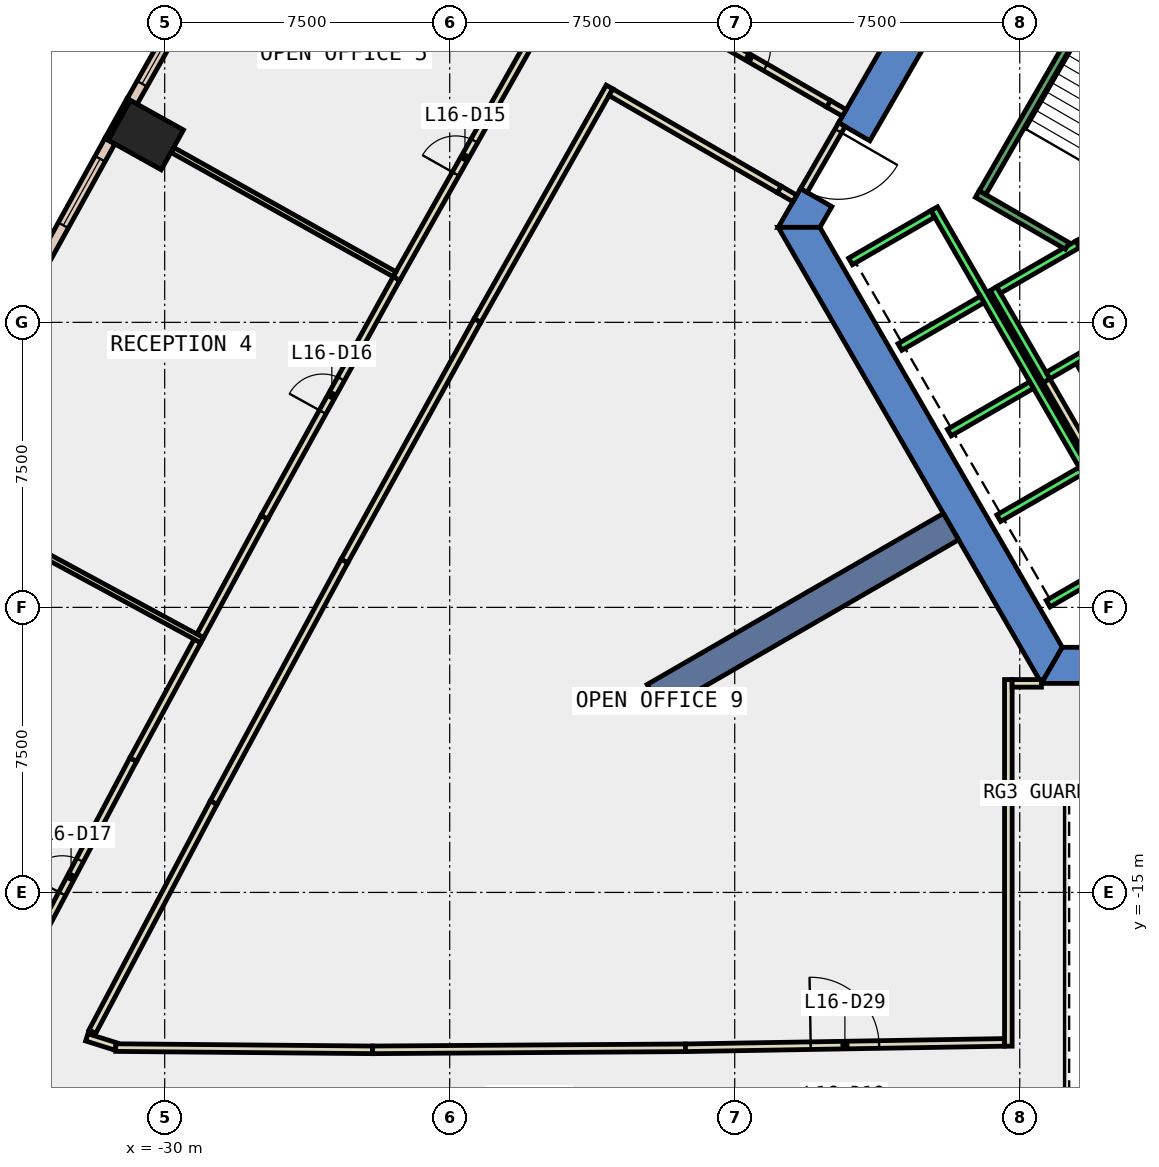
"""IFC4 building model, lengths in metres.
Left out: names, types, materials, properties, quantities, classifications, styles, units other than length and angle.
Written with IfcOpenShell. Run it as: python <this file> out.ifc"""

import sys

from ifc_helpers import new_model, si_unit, direction, frame, frame_2d, origin, origin_2d, place, context, subcontext, project, spatial, polyline, rectangle, outline, extrude, element, fill, save


model = new_model("IFC4")
c1 = context("Model", 3, precision=1e-05, world=origin(), true_north=direction((0.0, 1.0)))
c2 = subcontext(c1, "Body", "Model", "MODEL_VIEW")
j1 = project(units=[si_unit("LENGTHUNIT", "METRE"), si_unit("PLANEANGLEUNIT", "RADIAN")], contexts=[c1])
p1 = place(None, origin())
s1 = spatial("IfcSite", under=j1, at=p1, CompositionType="ELEMENT")
p2 = place(p1, origin())
s2 = spatial("IfcBuilding", under=s1, at=p2, CompositionType="ELEMENT")
p3 = place(p2, frame((0.0, 0.0, 77.0)))
s3 = spatial("IfcBuildingStorey", under=s2, at=p3, CompositionType="ELEMENT", Elevation=77.0)
p4 = place(p3, frame((-30.497, 4.928, -0.4), z_axis=(0.0, 0.0, 1.0), x_axis=(0.486914781103, 0.873449481048, 0.0)))
e1 = element("IfcColumn", 1, at=p4, inside=s3, PredefinedType="COLUMN", context=c2, shape_type="SweptSolid", body=[
    extrude(rectangle(XDim=1.2, YDim=1.6, at=origin_2d()), origin(), (0.0, 0.0, 1.0), 4.0),
])
p5 = place(p3, frame((0.0, 0.0, -0.4)))
e2 = element("IfcWall", 2, at=p5, inside=s3, PredefinedType="SHEAR", context=c2, shape_type="SweptSolid", body=[
    extrude(outline(polyline([(-12.267, 5.252), (-11.444, 4.777), (-6.38, 13.55), (-6.928, 14.5), (-12.267, 5.252)])), origin(), (0.0, 0.0, 1.0), 4.0),
])
p6 = place(p3, frame((0.0, 0.0, -0.4)))
e3 = element("IfcWall", 3, at=p6, inside=s3, PredefinedType="SHEAR", context=c2, shape_type="SweptSolid", body=[
    extrude(outline(polyline([(-12.444, 3.045), (-13.267, 3.52), (-13.856, 2.5), (-12.759, 2.5), (-12.444, 3.045)])), origin(), (0.0, 0.0, 1.0), 4.0),
])
p7 = place(p3, frame((0.0, 0.0, -0.4)))
e4 = element("IfcWall", 4, at=p7, inside=s3, PredefinedType="SHEAR", context=c2, shape_type="SweptSolid", body=[
    extrude(outline(polyline([(-13.856, 2.5), (-6.928, -9.5), (-6.38, -8.55), (-12.759, 2.5), (-13.856, 2.5)])), origin(), (0.0, 0.0, 1.0), 4.0),
])
p8 = place(p3, frame((0.0, 0.0, -0.4)))
e5 = element("IfcWall", 5, at=p8, inside=s3, PredefinedType="SHEAR", context=c2, shape_type="SweptSolid", body=[
    extrude(outline(polyline([(3.75, -9.5), (3.75, -8.55), (-6.38, -8.55), (-6.928, -9.5), (3.75, -9.5)])), origin(), (0.0, 0.0, 1.0), 4.0),
])
p9 = place(p3, frame((-9.31, -5.375, -0.4), z_axis=(0.0, 0.0, 1.0), x_axis=(-0.866017533419, -0.500013631625, 0.0)))
e6 = element("IfcWall", 6, at=p9, inside=s3, PredefinedType="SHEAR", context=c2, shape_type="SweptSolid", body=[
    extrude(rectangle(XDim=9.0, YDim=0.8, at=frame_2d((4.5, 0.0))), origin(), (0.0, 0.0, 1.0), 4.0),
])
p10 = place(p3, frame((-30.947, 5.866, 0.0), z_axis=(0.0, 0.0, 1.0), x_axis=(-0.486817526853, -0.873503689488, 0.0)))
e7 = element("IfcWall", 7, at=p10, inside=s3, PredefinedType="STANDARD", context=c2, shape_type="SweptSolid", body=[
    extrude(rectangle(XDim=1.2, YDim=0.1, at=frame_2d((0.6, 0.0))), origin(), (0.0, 0.0, 1.0), 3.6),
])
p11 = place(p3, frame((-27.84, 11.151, 0.0), z_axis=(0.0, 0.0, 1.0), x_axis=(-0.492097935349, -0.870539845168, 0.0)))
e8 = element("IfcWall", 8, at=p11, inside=s3, PredefinedType="STANDARD", context=c2, shape_type="SweptSolid", body=[
    extrude(rectangle(XDim=6.131, YDim=0.3, at=frame_2d((3.065, 0.0))), origin(), (0.0, 0.0, 1.0), 3.6),
])
p12 = place(p11, frame((0.533, 0.0, 0.9)))
e9 = element("IfcOpeningElement", 9, at=p12, cuts=e8, PredefinedType="OPENING", context=c2, shape_type="SweptSolid", body=[
    extrude(rectangle(XDim=2.0, YDim=2.6, at=frame_2d((1.0, 1.3))), frame((0.0, 0.16, 0.0), z_axis=(0.0, -1.0, 0.0), x_axis=(1.0, 0.0, 0.0)), (0.0, 0.0, 1.0), 0.32),
])
p13 = place(p11, frame((3.598, 0.0, 0.9)))
e10 = element("IfcOpeningElement", 10, at=p13, cuts=e8, PredefinedType="OPENING", context=c2, shape_type="SweptSolid", body=[
    extrude(rectangle(XDim=2.0, YDim=2.6, at=frame_2d((1.0, 1.3))), frame((0.0, 0.16, 0.0), z_axis=(0.0, -1.0, 0.0), x_axis=(1.0, 0.0, 0.0)), (0.0, 0.0, 1.0), 0.32),
])
p14 = place(p3, frame((-31.442, 4.769, 0.0), z_axis=(0.0, 0.0, 1.0), x_axis=(-0.484025698618, -0.875053782963, 0.0)))
e11 = element("IfcWall", 11, at=p14, inside=s3, PredefinedType="STANDARD", context=c2, shape_type="SweptSolid", body=[
    extrude(rectangle(XDim=6.13, YDim=0.3, at=frame_2d((3.065, 0.0))), origin(), (0.0, 0.0, 1.0), 3.6),
])
p15 = place(p14, frame((0.532, 0.0, 0.9)))
e12 = element("IfcOpeningElement", 12, at=p15, cuts=e11, PredefinedType="OPENING", context=c2, shape_type="SweptSolid", body=[
    extrude(rectangle(XDim=2.0, YDim=2.6, at=frame_2d((1.0, 1.3))), frame((0.0, 0.16, 0.0), z_axis=(0.0, -1.0, 0.0), x_axis=(1.0, 0.0, 0.0)), (0.0, 0.0, 1.0), 0.32),
])
p16 = place(p14, frame((3.597, 0.0, 0.9)))
e13 = element("IfcOpeningElement", 13, at=p16, cuts=e11, PredefinedType="OPENING", context=c2, shape_type="SweptSolid", body=[
    extrude(rectangle(XDim=2.0, YDim=2.6, at=frame_2d((1.0, 1.3))), frame((0.0, 0.16, 0.0), z_axis=(0.0, -1.0, 0.0), x_axis=(1.0, 0.0, 0.0)), (0.0, 0.0, 1.0), 0.32),
])
p17 = place(p3, frame((-17.133, 8.408, 0.0), z_axis=(0.0, 0.0, 1.0), x_axis=(0.866005140137, -0.500035096025, 0.0)))
e14 = element("IfcWall", 14, at=p17, inside=s3, PredefinedType="PARTITIONING", context=c2, shape_type="SweptSolid", body=[
    extrude(rectangle(XDim=5.317, YDim=0.2, at=frame_2d((2.659, 0.0))), origin(), (0.0, 0.0, 1.0), 3.6),
])
p18 = place(p17, frame((2.396, 0.0, 0.0)))
e15 = element("IfcOpeningElement", 15, at=p18, cuts=e14, PredefinedType="OPENING", context=c2, shape_type="SweptSolid", body=[
    extrude(rectangle(XDim=1.0, YDim=2.1, at=frame_2d((0.5, 1.05))), frame((0.0, 0.11, 0.0), z_axis=(0.0, -1.0, 0.0), x_axis=(1.0, 0.0, 0.0)), (0.0, 0.0, 1.0), 0.22),
])
p19 = place(p3, frame((-13.417, 3.26, 0.0), z_axis=(0.0, 0.0, 1.0), x_axis=(-0.865929261247, 0.500166486798, 0.0)))
e16 = element("IfcWall", 16, at=p19, inside=s3, PredefinedType="PARTITIONING", context=c2, shape_type="SweptSolid", body=[
    extrude(rectangle(XDim=0.476, YDim=0.2, at=frame_2d((0.238, 0.0))), origin(), (0.0, 0.0, 1.0), 2.4),
])
p20 = place(p3, frame((-18.295, 6.192, 0.0), z_axis=(0.0, 0.0, 1.0), x_axis=(-0.492193980341, -0.870485545954, 0.0)))
e17 = element("IfcWall", 17, at=p20, inside=s3, PredefinedType="PARTITIONING", context=c2, shape_type="SweptSolid", body=[
    extrude(rectangle(XDim=7.06, YDim=0.2, at=frame_2d((3.53, 0.0))), origin(), (0.0, 0.0, 1.0), 3.6),
])
p21 = place(p3, frame((-21.77, 0.046, 0.0), z_axis=(0.0, 0.0, 1.0), x_axis=(-0.484062485326, -0.875033433818, 0.0)))
e18 = element("IfcWall", 18, at=p21, inside=s3, PredefinedType="PARTITIONING", context=c2, shape_type="SweptSolid", body=[
    extrude(rectangle(XDim=7.23, YDim=0.2, at=frame_2d((3.615, 0.0))), origin(), (0.0, 0.0, 1.0), 3.6),
])
p22 = place(p3, frame((-25.27, -6.281, 0.0), z_axis=(0.0, 0.0, 1.0), x_axis=(-0.476128647722, -0.879375636926, 0.0)))
e19 = element("IfcWall", 19, at=p22, inside=s3, PredefinedType="PARTITIONING", context=c2, shape_type="SweptSolid", body=[
    extrude(rectangle(XDim=7.229, YDim=0.2, at=frame_2d((3.615, 0.0))), origin(), (0.0, 0.0, 1.0), 3.6),
])
p23 = place(p3, frame((-28.712, -12.638, 0.0), z_axis=(0.0, 0.0, 1.0), x_axis=(-0.46804565502, -0.883704285843, 0.0)))
e20 = element("IfcWall", 20, at=p23, inside=s3, PredefinedType="PARTITIONING", context=c2, shape_type="SweptSolid", body=[
    extrude(rectangle(XDim=6.818, YDim=0.2, at=frame_2d((3.409, 0.0))), origin(), (0.0, 0.0, 1.0), 3.6),
])
p24 = place(p3, frame((-32.05, -18.813, 0.0), z_axis=(0.0, 0.0, 1.0), x_axis=(0.953816959026, -0.300388429661, 0.0)))
e21 = element("IfcWall", 21, at=p24, inside=s3, PredefinedType="PARTITIONING", context=c2, shape_type="SweptSolid", body=[
    extrude(rectangle(XDim=0.802, YDim=0.2, at=frame_2d((0.401, 0.0))), origin(), (0.0, 0.0, 1.0), 3.6),
])
p25 = place(p3, frame((-31.289, -19.083, 0.0), z_axis=(0.0, 0.0, 1.0), x_axis=(0.999961820006, -0.00873833678, 0.0)))
e22 = element("IfcWall", 22, at=p25, inside=s3, PredefinedType="PARTITIONING", context=c2, shape_type="SweptSolid", body=[
    extrude(rectangle(XDim=6.761, YDim=0.2, at=frame_2d((3.381, 0.0))), origin(), (0.0, 0.0, 1.0), 3.6),
])
p26 = place(p3, frame((-24.528, -19.142, 0.0), z_axis=(0.0, 0.0, 1.0), x_axis=(0.999978315754, 0.00658544011, 0.0)))
e23 = element("IfcWall", 23, at=p26, inside=s3, PredefinedType="PARTITIONING", context=c2, shape_type="SweptSolid", body=[
    extrude(rectangle(XDim=8.23, YDim=0.2, at=frame_2d((4.115, 0.0))), origin(), (0.0, 0.0, 1.0), 3.6),
])
p27 = place(p3, frame((-16.298, -19.088, 0.0), z_axis=(0.0, 0.0, 1.0), x_axis=(0.999857252997, 0.016895964865, 0.0)))
e24 = element("IfcWall", 24, at=p27, inside=s3, PredefinedType="PARTITIONING", context=c2, shape_type="SweptSolid", body=[
    extrude(rectangle(XDim=8.395, YDim=0.2, at=frame_2d((4.198, 0.0))), origin(), (0.0, 0.0, 1.0), 3.6),
])
p28 = place(p27, frame((3.298, 0.0, 0.0)))
e25 = element("IfcOpeningElement", 25, at=p28, cuts=e24, PredefinedType="OPENING", context=c2, shape_type="SweptSolid", body=[
    extrude(rectangle(XDim=1.8, YDim=2.1, at=frame_2d((0.9, 1.05))), frame((0.0, 0.11, 0.0), z_axis=(0.0, -1.0, 0.0), x_axis=(1.0, 0.0, 0.0)), (0.0, 0.0, 1.0), 0.22),
])
p29 = place(p3, frame((-23.901, 1.152, 0.0), z_axis=(0.0, 0.0, 1.0), x_axis=(0.492063845089, 0.870559114797, 0.0)))
e26 = element("IfcWall", 26, at=p29, inside=s3, PredefinedType="PARTITIONING", context=c2, shape_type="SweptSolid", body=[
    extrude(rectangle(XDim=7.326, YDim=0.2, at=frame_2d((3.663, 0.0))), origin(), (0.0, 0.0, 1.0), 3.6),
])
p30 = place(p29, frame((3.163, 0.0, 0.0)))
e27 = element("IfcOpeningElement", 27, at=p30, cuts=e26, PredefinedType="OPENING", context=c2, shape_type="SweptSolid", body=[
    extrude(rectangle(XDim=1.0, YDim=2.1, at=frame_2d((0.5, 1.05))), frame((0.0, 0.11, 0.0), z_axis=(0.0, -1.0, 0.0), x_axis=(1.0, 0.0, 0.0)), (0.0, 0.0, 1.0), 0.22),
])
p31 = place(p3, frame((-29.066, -8.251, 0.0), z_axis=(0.0, 0.0, 1.0), x_axis=(0.476123690619, 0.879378320878, 0.0)))
e28 = element("IfcWall", 28, at=p31, inside=s3, PredefinedType="PARTITIONING", context=c2, shape_type="SweptSolid", body=[
    extrude(rectangle(XDim=3.552, YDim=0.2, at=frame_2d((1.776, 0.0))), origin(), (0.0, 0.0, 1.0), 3.6),
])
p32 = place(p3, frame((-27.375, -5.128, 0.0), z_axis=(0.0, 0.0, 1.0), x_axis=(0.484068035355, 0.875030363558, 0.0)))
e29 = element("IfcWall", 29, at=p32, inside=s3, PredefinedType="PARTITIONING", context=c2, shape_type="SweptSolid", body=[
    extrude(rectangle(XDim=7.177, YDim=0.2, at=frame_2d((3.588, 0.0))), origin(), (0.0, 0.0, 1.0), 3.6),
])
p33 = place(p32, frame((3.163, 0.0, 0.0)))
e30 = element("IfcOpeningElement", 30, at=p33, cuts=e29, PredefinedType="OPENING", context=c2, shape_type="SweptSolid", body=[
    extrude(rectangle(XDim=1.0, YDim=2.1, at=frame_2d((0.5, 1.05))), frame((0.0, 0.11, 0.0), z_axis=(0.0, -1.0, 0.0), x_axis=(1.0, 0.0, 0.0)), (0.0, 0.0, 1.0), 0.22),
])
p34 = place(p3, frame((-34.1, -17.683, 0.0), z_axis=(0.0, 0.0, 1.0), x_axis=(0.468043346631, 0.883705508456, 0.0)))
e31 = element("IfcWall", 31, at=p34, inside=s3, PredefinedType="PARTITIONING", context=c2, shape_type="SweptSolid", body=[
    extrude(rectangle(XDim=6.991, YDim=0.2, at=frame_2d((3.496, 0.0))), origin(), (0.0, 0.0, 1.0), 3.6),
])
p35 = place(p34, frame((2.996, 0.0, 0.0)))
e32 = element("IfcOpeningElement", 32, at=p35, cuts=e31, PredefinedType="OPENING", context=c2, shape_type="SweptSolid", body=[
    extrude(rectangle(XDim=1.0, YDim=2.1, at=frame_2d((0.5, 1.05))), frame((0.0, 0.11, 0.0), z_axis=(0.0, -1.0, 0.0), x_axis=(1.0, 0.0, 0.0)), (0.0, 0.0, 1.0), 0.22),
])
p36 = place(p3, frame((-30.828, -11.505, 0.0), z_axis=(0.0, 0.0, 1.0), x_axis=(0.476267641688, 0.879300365905, 0.0)))
e33 = element("IfcWall", 33, at=p36, inside=s3, PredefinedType="PARTITIONING", context=c2, shape_type="SweptSolid", body=[
    extrude(rectangle(XDim=3.55, YDim=0.2, at=frame_2d((1.775, 0.0))), origin(), (0.0, 0.0, 1.0), 3.6),
])
p37 = place(p3, frame((-5.126, -2.422, 0.0), z_axis=(0.0, 0.0, 1.0), x_axis=(-0.500062241894, 0.865989465428, 0.0)))
e34 = element("IfcWall", 34, at=p37, inside=s3, PredefinedType="PARTITIONING", context=c2, shape_type="SweptSolid", body=[
    extrude(rectangle(XDim=1.7, YDim=0.2, at=frame_2d((0.85, 0.0))), origin(), (0.0, 0.0, 1.0), 3.6),
])
p38 = place(p3, frame((-5.492, -3.788, 0.0), z_axis=(0.0, 0.0, 1.0), x_axis=(-0.500008949224, 0.866020236886, 0.0)))
e35 = element("IfcWall", 35, at=p38, inside=s3, PredefinedType="PARTITIONING", context=c2, shape_type="SweptSolid", body=[
    extrude(rectangle(XDim=2.68, YDim=0.2, at=frame_2d((1.34, 0.0))), origin(), (0.0, 0.0, 1.0), 3.6),
])
p39 = place(p3, frame((-7.8, -19.046, 0.0), z_axis=(0.0, 0.0, 1.0), x_axis=(0.0, 1.0, 0.0)))
e36 = element("IfcWall", 36, at=p39, inside=s3, PredefinedType="PARTITIONING", context=c2, shape_type="SweptSolid", body=[
    extrude(rectangle(XDim=9.647, YDim=0.2, at=frame_2d((4.823, 0.0))), origin(), (0.0, 0.0, 1.0), 3.6),
])
p40 = place(p3, frame((-7.7, -9.499, 0.0), z_axis=(0.0, 0.0, 1.0), x_axis=(1.0, 0.0, 0.0)))
e37 = element("IfcWall", 37, at=p40, inside=s3, PredefinedType="PARTITIONING", context=c2, shape_type="SweptSolid", body=[
    extrude(rectangle(XDim=0.771, YDim=0.2, at=frame_2d((0.385, 0.0))), origin(), (0.0, 0.0, 1.0), 3.6),
])
p41 = place(p3, frame((-23.951, 1.266, 0.0), z_axis=(0.0, 0.0, 1.0), x_axis=(-0.872786908026, 0.488101437385, 0.0)))
e38 = element("IfcWall", 38, at=p41, inside=s3, PredefinedType="PARTITIONING", context=c2, shape_type="SweptSolid", body=[
    extrude(rectangle(XDim=6.681, YDim=0.15, at=frame_2d((3.34, 0.0))), origin(), (0.0, 0.0, 1.0), 3.6),
])
p42 = place(p3, frame((-29.014, -8.365, 0.0), z_axis=(0.0, 0.0, 1.0), x_axis=(-0.879354069803, 0.476168478504, 0.0)))
e39 = element("IfcWall", 39, at=p42, inside=s3, PredefinedType="PARTITIONING", context=c2, shape_type="SweptSolid", body=[
    extrude(rectangle(XDim=8.299, YDim=0.15, at=frame_2d((4.15, 0.0))), origin(), (0.0, 0.0, 1.0), 3.6),
])
p43 = place(p3, frame((-12.18, 5.202, 0.0), z_axis=(0.0, 0.0, 1.0), x_axis=(-0.50002537861, -0.866010750942, 0.0)))
e40 = element("IfcWall", 40, at=p43, inside=s3, PredefinedType="PARTITIONING", context=c2, shape_type="SweptSolid", body=[
    extrude(rectangle(XDim=2.0, YDim=0.2, at=frame_2d((1.0, 0.0))), origin(), (0.0, 0.0, 1.0), 2.4),
])
p44 = place(p43, frame((0.19, 0.0, 0.0)))
e41 = element("IfcOpeningElement", 41, at=p44, cuts=e40, PredefinedType="OPENING", context=c2, shape_type="SweptSolid", body=[
    extrude(rectangle(XDim=1.8, YDim=2.1, at=frame_2d((0.9, 1.05))), frame((0.0, 0.11, 0.0), z_axis=(0.0, -1.0, 0.0), x_axis=(1.0, 0.0, 0.0)), (0.0, 0.0, 1.0), 0.22),
])
p45 = place(p3, frame((-12.528, 5.749, 0.0), z_axis=(0.0, 0.0, 1.0), x_axis=(0.866305462299, -0.499514610387, 0.0)))
e42 = element("IfcWall", 42, at=p45, inside=s3, PredefinedType="PARTITIONING", context=c2, shape_type="SweptSolid", body=[
    extrude(rectangle(XDim=0.475, YDim=0.2, at=frame_2d((0.237, 0.0))), origin(), (0.0, 0.0, 1.0), 2.4),
])
p46 = place(p3, frame((-13.829, 3.498, 0.0), z_axis=(0.0, 0.0, 1.0), x_axis=(-0.866040105854, 0.499974534403, 0.0)))
e43 = element("IfcWall", 43, at=p46, inside=s3, PredefinedType="PARTITIONING", context=c2, shape_type="SweptSolid", body=[
    extrude(rectangle(XDim=5.114, YDim=0.2, at=frame_2d((2.557, 0.0))), origin(), (0.0, 0.0, 1.0), 3.6),
])
p47 = place(p3, frame((-5.94, 2.188, 0.0), z_axis=(0.0, 0.0, 1.0), x_axis=(0.49994636267, -0.866056369097, 0.0)))
e44 = element("IfcWall", 44, at=p47, inside=s3, PredefinedType="STANDARD", context=c2, shape_type="SweptSolid", body=[
    extrude(rectangle(XDim=2.8, YDim=0.2, at=frame_2d((1.4, 0.0))), origin(), (0.0, 0.0, 1.0), 3.6),
])
p48 = place(p47, frame((1.225, 0.0, 0.0)))
e45 = element("IfcOpeningElement", 45, at=p48, cuts=e44, PredefinedType="OPENING", context=c2, shape_type="SweptSolid", body=[
    extrude(rectangle(XDim=1.1, YDim=2.1, at=frame_2d((0.55, 1.05))), frame((0.0, 0.11, 0.0), z_axis=(0.0, -1.0, 0.0), x_axis=(1.0, 0.0, 0.0)), (0.0, 0.0, 1.0), 0.22),
])
p49 = place(p3, frame((-8.192, 0.888, 0.0), z_axis=(0.0, 0.0, 1.0), x_axis=(0.49994636267, -0.866056369097, 0.0)))
e46 = element("IfcWall", 46, at=p49, inside=s3, PredefinedType="STANDARD", context=c2, shape_type="SweptSolid", body=[
    extrude(rectangle(XDim=2.8, YDim=0.2, at=frame_2d((1.4, 0.0))), origin(), (0.0, 0.0, 1.0), 3.6),
])
for number, where, z_axis, x_axis in (
    (47, (-5.977, 2.052, 0.0), (0.0, 0.0, 1.0), (-0.866, -0.5, 0.0)),
    (48, (-4.677, -0.2, 0.0), (0.0, 0.0, 1.0), (-0.866, -0.5, 0.0)),
):
    element("IfcWall", number, at=place(p3, frame(where, z_axis=z_axis, x_axis=x_axis)), inside=s3, PredefinedType="STANDARD", context=c2, shape_type="SweptSolid", body=[
        extrude(rectangle(XDim=2.399, YDim=0.2, at=frame_2d((1.2, 0.0))), origin(), (0.0, 0.0, 1.0), 3.6),
    ])
p50 = place(p3, frame((-9.751, 2.99, 0.0), z_axis=(0.0, 0.0, 1.0), x_axis=(0.50000090737, -0.866024879913, 0.0)))
e49 = element("IfcWall", 49, at=p50, inside=s3, PredefinedType="STANDARD", context=c2, shape_type="SweptSolid", body=[
    extrude(rectangle(XDim=10.6, YDim=0.2, at=frame_2d((5.3, 0.0))), origin(), (0.0, 0.0, 1.0), 3.6),
])
p51 = place(p3, frame((-9.788, 2.853, 0.0), z_axis=(0.0, 0.0, 1.0), x_axis=(-0.865998541277, -0.500046524342, 0.0)))
e50 = element("IfcWall", 50, at=p51, inside=s3, PredefinedType="STANDARD", context=c2, shape_type="SweptSolid", body=[
    extrude(rectangle(XDim=2.5, YDim=0.2, at=frame_2d((1.25, 0.0))), origin(), (0.0, 0.0, 1.0), 3.6),
])
for number, where, z_axis, x_axis in (
    (51, (-8.488, 0.602, 0.0), (0.0, 0.0, 1.0), (-0.866, -0.5, 0.0)),
    (52, (-7.188, -1.65, 0.0), (0.0, 0.0, 1.0), (-0.866, -0.5, 0.0)),
    (53, (-5.888, -3.902, 0.0), (0.0, 0.0, 1.0), (-0.866, -0.5, 0.0)),
    (54, (-4.588, -6.153, 0.0), (0.0, 0.0, 1.0), (-0.866, -0.5, 0.0)),
):
    element("IfcWall", number, at=place(p3, frame(where, z_axis=z_axis, x_axis=x_axis)), inside=s3, PredefinedType="STANDARD", context=c2, shape_type="SweptSolid", body=[
        extrude(rectangle(XDim=2.5, YDim=0.2, at=frame_2d((1.25, 0.0))), origin(), (0.0, 0.0, 1.0), 3.6),
    ])
p52 = place(p3, frame((-6.25, 2.01, 0.0), z_axis=(0.0, 0.0, 1.0), x_axis=(-0.86611865017, 0.499838457731, 0.0)))
e55 = element("IfcWall", 55, at=p52, inside=s3, PredefinedType="STANDARD", context=c2, shape_type="SweptSolid", body=[
    extrude(rectangle(XDim=2.733, YDim=0.2, at=frame_2d((1.366, 0.0))), origin(), (0.0, 0.0, 1.0), 3.6),
])
p53 = place(p3, frame((-5.03, 9.388, 0.0), z_axis=(0.0, 0.0, 1.0), x_axis=(-0.499978703459, -0.866037698999, 0.0)))
e56 = element("IfcWall", 56, at=p53, inside=s3, PredefinedType="STANDARD", context=c2, shape_type="SweptSolid", body=[
    extrude(rectangle(XDim=6.9, YDim=0.2, at=frame_2d((3.45, 0.0))), origin(), (0.0, 0.0, 1.0), 3.6),
])
p54 = place(p13, origin())
e57 = element("IfcWindow", 57, at=p54, inside=s3, PartitioningType="SINGLE_PANEL", PredefinedType="WINDOW", context=c2, shape_type="SweptSolid", body=[
    extrude(rectangle(XDim=2.0, YDim=2.6, at=frame_2d((1.0, 1.3))), frame((0.0, 0.03, 0.0), z_axis=(0.0, -1.0, 0.0), x_axis=(1.0, 0.0, 0.0)), (0.0, 0.0, 1.0), 0.06),
])
fill(e10, e57)
p55 = place(p15, origin())
e58 = element("IfcWindow", 58, at=p55, inside=s3, PartitioningType="SINGLE_PANEL", PredefinedType="WINDOW", context=c2, shape_type="SweptSolid", body=[
    extrude(rectangle(XDim=2.0, YDim=2.6, at=frame_2d((1.0, 1.3))), frame((0.0, 0.03, 0.0), z_axis=(0.0, -1.0, 0.0), x_axis=(1.0, 0.0, 0.0)), (0.0, 0.0, 1.0), 0.06),
])
fill(e12, e58)
p56 = place(p30, origin())
e59 = element("IfcDoor", 59, at=p56, inside=s3, OperationType="SINGLE_SWING_LEFT", PredefinedType="DOOR", context=c2, shape_type="SweptSolid", body=[
    extrude(rectangle(XDim=1.0, YDim=2.1, at=frame_2d((0.5, 1.05))), frame((0.0, 0.025, 0.0), z_axis=(0.0, -1.0, 0.0), x_axis=(1.0, 0.0, 0.0)), (0.0, 0.0, 1.0), 0.05),
])
fill(e27, e59)
p57 = place(p33, origin())
e60 = element("IfcDoor", 60, at=p57, inside=s3, OperationType="SINGLE_SWING_LEFT", PredefinedType="DOOR", context=c2, shape_type="SweptSolid", body=[
    extrude(rectangle(XDim=1.0, YDim=2.1, at=frame_2d((0.5, 1.05))), frame((0.0, 0.025, 0.0), z_axis=(0.0, -1.0, 0.0), x_axis=(1.0, 0.0, 0.0)), (0.0, 0.0, 1.0), 0.05),
])
fill(e30, e60)
p58 = place(p35, origin())
e61 = element("IfcDoor", 61, at=p58, inside=s3, OperationType="SINGLE_SWING_LEFT", PredefinedType="DOOR", context=c2, shape_type="SweptSolid", body=[
    extrude(rectangle(XDim=1.0, YDim=2.1, at=frame_2d((0.5, 1.05))), frame((0.0, 0.025, 0.0), z_axis=(0.0, -1.0, 0.0), x_axis=(1.0, 0.0, 0.0)), (0.0, 0.0, 1.0), 0.05),
])
fill(e32, e61)
p59 = place(p28, origin())
e62 = element("IfcDoor", 62, at=p59, inside=s3, OperationType="DOUBLE_DOOR_SINGLE_SWING", PredefinedType="DOOR", context=c2, shape_type="SweptSolid", body=[
    extrude(rectangle(XDim=1.8, YDim=2.1, at=frame_2d((0.9, 1.05))), frame((0.0, 0.025, 0.0), z_axis=(0.0, -1.0, 0.0), x_axis=(1.0, 0.0, 0.0)), (0.0, 0.0, 1.0), 0.05),
])
fill(e25, e62)
p60 = place(p18, origin())
e63 = element("IfcDoor", 63, at=p60, inside=s3, OperationType="SINGLE_SWING_LEFT", PredefinedType="DOOR", context=c2, shape_type="SweptSolid", body=[
    extrude(rectangle(XDim=1.0, YDim=2.1, at=frame_2d((0.5, 1.05))), frame((0.0, 0.025, 0.0), z_axis=(0.0, -1.0, 0.0), x_axis=(1.0, 0.0, 0.0)), (0.0, 0.0, 1.0), 0.05),
])
fill(e15, e63)
p61 = place(p44, origin())
e64 = element("IfcDoor", 64, at=p61, inside=s3, OperationType="DOUBLE_DOOR_SINGLE_SWING", PredefinedType="DOOR", context=c2, shape_type="SweptSolid", body=[
    extrude(rectangle(XDim=1.8, YDim=2.1, at=frame_2d((0.9, 1.05))), frame((0.0, 0.025, 0.0), z_axis=(0.0, -1.0, 0.0), x_axis=(1.0, 0.0, 0.0)), (0.0, 0.0, 1.0), 0.05),
])
fill(e41, e64)
save(model, sys.argv[1])
